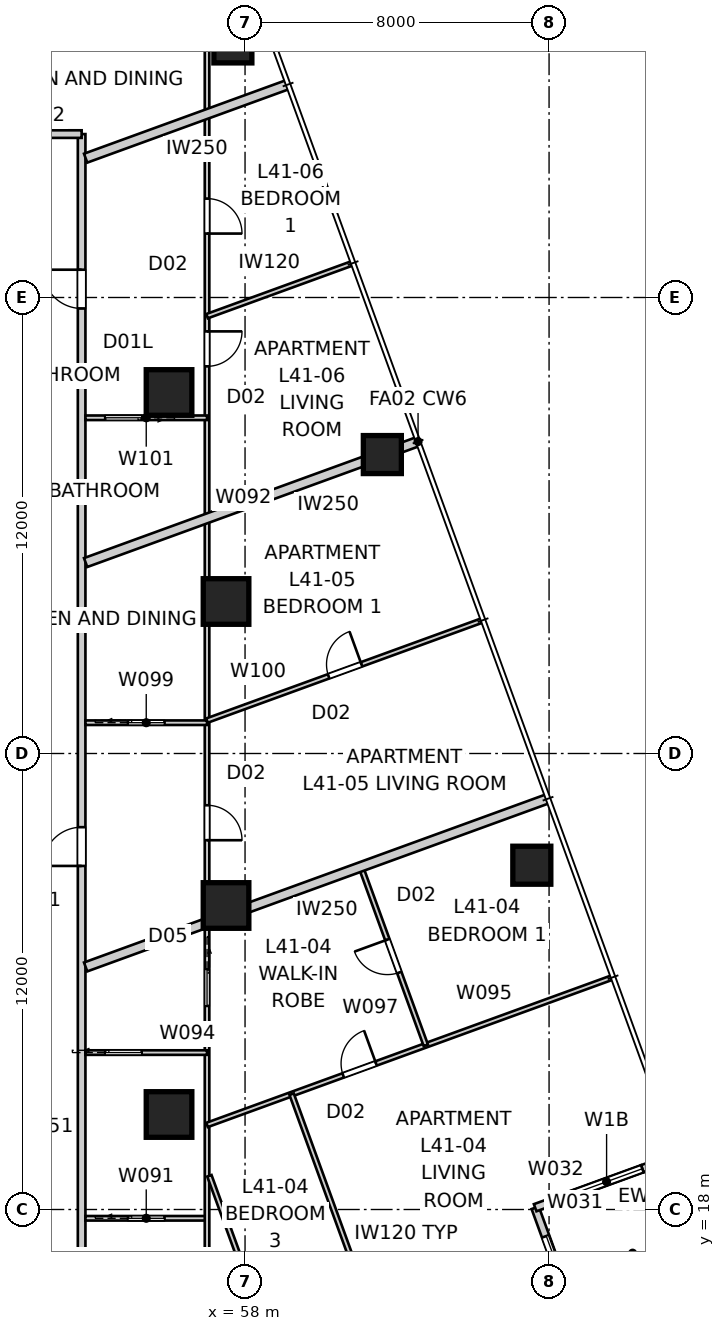
"""IFC4 building model, lengths in metres.
Left out: names, types, materials, properties, quantities, classifications, styles, units other than length and angle.
Written with IfcOpenShell. Run it as: python <this file> out.ifc"""

import sys

from ifc_helpers import new_model, si_unit, direction, frame, frame_2d, origin, origin_2d, place, context, subcontext, project, spatial, rectangle, extrude, element, fill, save


model = new_model("IFC4")
c1 = context("Model", 3, precision=1e-05, world=origin(), true_north=direction((0.0, 1.0)))
c2 = subcontext(c1, "Body", "Model", "MODEL_VIEW")
j1 = project(units=[si_unit("LENGTHUNIT", "METRE"), si_unit("PLANEANGLEUNIT", "RADIAN")], contexts=[c1])
p1 = place(None, origin())
s1 = spatial("IfcSite", under=j1, at=p1, CompositionType="ELEMENT")
p2 = place(p1, origin())
s2 = spatial("IfcBuilding", under=s1, at=p2, CompositionType="ELEMENT")
p3 = place(p2, frame((0.0, 0.0, 150.6)))
s3 = spatial("IfcBuildingStorey", under=s2, at=p3, CompositionType="ELEMENT", Elevation=150.6)
for number, where, z_axis, x_axis in (
    (1, (65.546, 27.06, 0.0), (0.0, 0.0, 1.0), (1.0, 0.0, 0.0)),
    (2, (61.613, 37.866, 0.0), (0.0, 0.0, 1.0), (1.0, 0.0, 0.0)),
    (3, (57.68, 48.673, 0.0), (0.0, 0.0, 1.0), (1.0, 0.0, 0.0)),
):
    element("IfcColumn", number, at=place(p3, frame(where, z_axis=z_axis, x_axis=x_axis)), inside=s3, PredefinedType="COLUMN", context=c2, shape_type="SweptSolid", body=[
        extrude(rectangle(XDim=1.0, YDim=1.0, at=origin_2d()), origin(), (0.0, 0.0, 1.0), 3.4),
    ])
for number, where, z_axis, x_axis in (
    (4, (57.5, 26.0, 0.0), (0.0, 0.0, 1.0), (1.0, 0.0, 0.0)),
    (5, (57.5, 34.0, 0.0), (0.0, 0.0, 1.0), (1.0, 0.0, 0.0)),
    (6, (56.0, 39.5, 0.0), (0.0, 0.0, 1.0), (1.0, 0.0, 0.0)),
    (7, (56.0, 20.5, 0.0), (0.0, 0.0, 1.0), (1.0, 0.0, 0.0)),
):
    element("IfcColumn", number, at=place(p3, frame(where, z_axis=z_axis, x_axis=x_axis)), inside=s3, PredefinedType="COLUMN", context=c2, shape_type="SweptSolid", body=[
        extrude(rectangle(XDim=1.2, YDim=1.2, at=origin_2d()), origin(), (0.0, 0.0, 1.0), 3.4),
    ])
p4 = place(p3, frame((66.729, 15.04, 0.0), z_axis=(0.0, 0.0, 1.0), x_axis=(-0.342018703306, 0.939693144909, 0.0)))
e8 = element("IfcWall", 8, at=p4, inside=s3, PredefinedType="SOLIDWALL", context=c2, shape_type="SweptSolid", body=[
    extrude(rectangle(XDim=3.2, YDim=0.2, at=frame_2d((1.6, 0.0))), origin(), (0.0, 0.0, 1.0), 2.722),
])
p5 = place(p4, origin())
e9 = element("IfcOpeningElement", 9, at=p5, cuts=e8, PredefinedType="OPENING", context=c2, shape_type="SweptSolid", body=[
    extrude(rectangle(XDim=2.4, YDim=2.1, at=frame_2d((1.2, 1.05))), frame((0.0, 0.11, 0.0), z_axis=(0.0, -1.0, 0.0), x_axis=(1.0, 0.0, 0.0)), (0.0, 0.0, 1.0), 0.22),
])
p6 = place(p3, frame((65.634, 18.047, 0.0), z_axis=(0.0, 0.0, 1.0), x_axis=(0.939712609717, 0.341965219194, 0.0)))
e10 = element("IfcWall", 10, at=p6, inside=s3, PredefinedType="SOLIDWALL", context=c2, shape_type="SweptSolid", body=[
    extrude(rectangle(XDim=3.0, YDim=0.2, at=frame_2d((1.5, 0.0))), origin(), (0.0, 0.0, 1.0), 2.722),
])
p7 = place(p6, frame((1.0, 0.0, 0.45)))
e11 = element("IfcOpeningElement", 11, at=p7, cuts=e10, PredefinedType="OPENING", context=c2, shape_type="SweptSolid", body=[
    extrude(rectangle(XDim=2.0, YDim=1.8, at=frame_2d((1.0, 0.9))), frame((0.0, 0.11, 0.0), z_axis=(0.0, -1.0, 0.0), x_axis=(1.0, 0.0, 0.0)), (0.0, 0.0, 1.0), 0.22),
])
p8 = place(p3, frame((68.453, 19.073, 0.0), z_axis=(0.0, 0.0, 1.0), x_axis=(0.939686455819, 0.342037080957, 0.0)))
e12 = element("IfcWall", 12, at=p8, inside=s3, PredefinedType="SOLIDWALL", context=c2, shape_type="SweptSolid", body=[
    extrude(rectangle(XDim=1.0, YDim=0.2, at=frame_2d((0.5, 0.0))), origin(), (0.0, 0.0, 1.0), 3.25),
])
p9 = place(p3, frame((53.7, 13.3, 0.0), z_axis=(0.0, 0.0, 1.0), x_axis=(0.0, 1.0, 0.0)))
e13 = element("IfcWall", 13, at=p9, inside=s3, PredefinedType="PARTITIONING", context=c2, shape_type="SweptSolid", body=[
    extrude(rectangle(XDim=33.0, YDim=0.2, at=frame_2d((16.5, 0.0))), origin(), (0.0, 0.0, 1.0), 3.25),
])
p10 = place(p9, frame((28.411, 0.0, 0.0)))
e14 = element("IfcOpeningElement", 14, at=p10, cuts=e13, PredefinedType="OPENING", context=c2, shape_type="SweptSolid", body=[
    extrude(rectangle(XDim=1.02, YDim=2.1, at=frame_2d((0.51, 1.05))), frame((0.0, 0.11, 0.0), z_axis=(0.0, -1.0, 0.0), x_axis=(1.0, 0.0, 0.0)), (0.0, 0.0, 1.0), 0.22),
])
p11 = place(p9, frame((13.741, 0.0, 0.0)))
e15 = element("IfcOpeningElement", 15, at=p11, cuts=e13, PredefinedType="OPENING", context=c2, shape_type="SweptSolid", body=[
    extrude(rectangle(XDim=1.02, YDim=2.34, at=frame_2d((0.51, 1.17))), frame((0.0, 0.11, 0.0), z_axis=(0.0, -1.0, 0.0), x_axis=(1.0, 0.0, 0.0)), (0.0, 0.0, 1.0), 0.22),
])
p12 = place(p3, frame((53.7, 46.3, 0.0), z_axis=(0.0, 0.0, 1.0), x_axis=(-1.0, 0.0, 0.0)))
e16 = element("IfcWall", 16, at=p12, inside=s3, PredefinedType="PARTITIONING", context=c2, shape_type="SweptSolid", body=[
    extrude(rectangle(XDim=4.458, YDim=0.2, at=frame_2d((2.229, 0.0))), origin(), (0.0, 0.0, 1.0), 3.25),
])
p13 = place(p12, frame((2.347, 0.0, 0.0)))
e17 = element("IfcOpeningElement", 17, at=p13, cuts=e16, PredefinedType="OPENING", context=c2, shape_type="SweptSolid", body=[
    extrude(rectangle(XDim=1.02, YDim=2.34, at=frame_2d((0.51, 1.17))), frame((0.0, 0.11, 0.0), z_axis=(0.0, -1.0, 0.0), x_axis=(1.0, 0.0, 0.0)), (0.0, 0.0, 1.0), 0.22),
])
p14 = place(p3, frame((62.553, 38.208, 0.0), z_axis=(0.0, 0.0, 1.0), x_axis=(-0.939693071685, -0.342018904489, 0.0)))
e18 = element("IfcWall", 18, at=p14, inside=s3, PredefinedType="PARTITIONING", context=c2, shape_type="SweptSolid", body=[
    extrude(rectangle(XDim=9.309, YDim=0.25, at=frame_2d((4.654, 0.0))), origin(), (0.0, 0.0, 1.0), 3.25),
])
p15 = place(p3, frame((65.973, 28.812, 0.0), z_axis=(0.0, 0.0, 1.0), x_axis=(-0.939692090592, -0.342021600019, 0.0)))
e19 = element("IfcWall", 19, at=p15, inside=s3, PredefinedType="PARTITIONING", context=c2, shape_type="SweptSolid", body=[
    extrude(rectangle(XDim=12.949, YDim=0.25, at=frame_2d((6.474, 0.0))), origin(), (0.0, 0.0, 1.0), 3.25),
])
p16 = place(p3, frame((59.132, 47.605, 0.0), z_axis=(0.0, 0.0, 1.0), x_axis=(-0.939690274876, -0.342026588591, 0.0)))
e20 = element("IfcWall", 20, at=p16, inside=s3, PredefinedType="PARTITIONING", context=c2, shape_type="SweptSolid", body=[
    extrude(rectangle(XDim=5.669, YDim=0.25, at=frame_2d((2.834, 0.0))), origin(), (0.0, 0.0, 1.0), 3.25),
])
p17 = place(p3, frame((53.8, 17.769, 0.0), z_axis=(0.0, 0.0, 1.0), x_axis=(1.0, 0.0, 0.0)))
e21 = element("IfcWall", 21, at=p17, inside=s3, PredefinedType="PARTITIONING", context=c2, shape_type="SweptSolid", body=[
    extrude(rectangle(XDim=3.2, YDim=0.12, at=frame_2d((1.6, 0.0))), origin(), (0.0, 0.0, 1.0), 3.25),
])
p18 = place(p17, frame((1.12, 0.0, 0.0)))
e22 = element("IfcOpeningElement", 22, at=p18, cuts=e21, PredefinedType="OPENING", context=c2, shape_type="SweptSolid", body=[
    extrude(rectangle(XDim=0.96, YDim=2.1, at=frame_2d((0.48, 1.05))), frame((0.0, 0.07, 0.0), z_axis=(0.0, -1.0, 0.0), x_axis=(1.0, 0.0, 0.0)), (0.0, 0.0, 1.0), 0.14),
])
p19 = place(p3, frame((57.0, 48.8, 0.0), z_axis=(0.0, 0.0, 1.0), x_axis=(0.0, -1.0, 0.0)))
e23 = element("IfcWall", 23, at=p19, inside=s3, PredefinedType="PARTITIONING", context=c2, shape_type="SweptSolid", body=[
    extrude(rectangle(XDim=38.113, YDim=0.12, at=frame_2d((19.056, 0.0))), origin(), (0.0, 0.0, 1.0), 2.55),
])
p20 = place(p19, frame((4.198, 0.0, 0.0)))
e24 = element("IfcOpeningElement", 24, at=p20, cuts=e23, PredefinedType="OPENING", context=c2, shape_type="SweptSolid", body=[
    extrude(rectangle(XDim=0.92, YDim=2.34, at=frame_2d((0.46, 1.17))), frame((0.0, 0.07, 0.0), z_axis=(0.0, -1.0, 0.0), x_axis=(1.0, 0.0, 0.0)), (0.0, 0.0, 1.0), 0.14),
])
p21 = place(p19, frame((7.692, 0.0, 0.0)))
e25 = element("IfcOpeningElement", 25, at=p21, cuts=e23, PredefinedType="OPENING", context=c2, shape_type="SweptSolid", body=[
    extrude(rectangle(XDim=0.92, YDim=2.34, at=frame_2d((0.46, 1.17))), frame((0.0, 0.07, 0.0), z_axis=(0.0, -1.0, 0.0), x_axis=(1.0, 0.0, 0.0)), (0.0, 0.0, 1.0), 0.14),
])
p22 = place(p19, frame((20.162, 0.0, 0.0)))
e26 = element("IfcOpeningElement", 26, at=p22, cuts=e23, PredefinedType="OPENING", context=c2, shape_type="SweptSolid", body=[
    extrude(rectangle(XDim=0.92, YDim=2.34, at=frame_2d((0.46, 1.17))), frame((0.0, 0.07, 0.0), z_axis=(0.0, -1.0, 0.0), x_axis=(1.0, 0.0, 0.0)), (0.0, 0.0, 1.0), 0.14),
])
p23 = place(p19, frame((34.056, 0.0, 0.0)))
e27 = element("IfcOpeningElement", 27, at=p23, cuts=e23, PredefinedType="OPENING", context=c2, shape_type="SweptSolid", body=[
    extrude(rectangle(XDim=0.92, YDim=2.34, at=frame_2d((0.46, 1.17))), frame((0.0, 0.07, 0.0), z_axis=(0.0, -1.0, 0.0), x_axis=(1.0, 0.0, 0.0)), (0.0, 0.0, 1.0), 0.14),
])
p24 = place(p19, frame((24.482, 0.0, 0.0)))
e28 = element("IfcOpeningElement", 28, at=p24, cuts=e23, PredefinedType="OPENING", context=c2, shape_type="SweptSolid", body=[
    extrude(rectangle(XDim=0.96, YDim=2.1, at=frame_2d((0.48, 1.05))), frame((0.0, 0.07, 0.0), z_axis=(0.0, -1.0, 0.0), x_axis=(1.0, 0.0, 0.0)), (0.0, 0.0, 1.0), 0.14),
])
p25 = place(p3, frame((53.8, 22.129, 0.0), z_axis=(0.0, 0.0, 1.0), x_axis=(1.0, 0.0, 0.0)))
e29 = element("IfcWall", 29, at=p25, inside=s3, PredefinedType="PARTITIONING", context=c2, shape_type="SweptSolid", body=[
    extrude(rectangle(XDim=3.2, YDim=0.12, at=frame_2d((1.6, 0.0))), origin(), (0.0, 0.0, 1.0), 3.25),
])
p26 = place(p25, frame((0.52, 0.0, 0.0)))
e30 = element("IfcOpeningElement", 30, at=p26, cuts=e29, PredefinedType="OPENING", context=c2, shape_type="SweptSolid", body=[
    extrude(rectangle(XDim=0.96, YDim=2.1, at=frame_2d((0.48, 1.05))), frame((0.0, 0.07, 0.0), z_axis=(0.0, -1.0, 0.0), x_axis=(1.0, 0.0, 0.0)), (0.0, 0.0, 1.0), 0.14),
])
p27 = place(p3, frame((57.0, 20.225, 0.0), z_axis=(0.0, 0.0, 1.0), x_axis=(0.939693965364, 0.342016449105, 0.0)))
e31 = element("IfcWall", 31, at=p27, inside=s3, PredefinedType="PARTITIONING", context=c2, shape_type="SweptSolid", body=[
    extrude(rectangle(XDim=11.328, YDim=0.12, at=frame_2d((5.664, 0.0))), origin(), (0.0, 0.0, 1.0), 3.25),
])
p28 = place(p27, frame((3.812, 0.0, 0.0)))
e32 = element("IfcOpeningElement", 32, at=p28, cuts=e31, PredefinedType="OPENING", context=c2, shape_type="SweptSolid", body=[
    extrude(rectangle(XDim=0.92, YDim=2.34, at=frame_2d((0.46, 1.17))), frame((0.0, 0.07, 0.0), z_axis=(0.0, -1.0, 0.0), x_axis=(1.0, 0.0, 0.0)), (0.0, 0.0, 1.0), 0.14),
])
p29 = place(p3, frame((62.29, 12.615, 0.0), z_axis=(0.0, 0.0, 1.0), x_axis=(-0.342038393654, 0.939685978009, 0.0)))
e33 = element("IfcWall", 33, at=p29, inside=s3, PredefinedType="PARTITIONING", context=c2, shape_type="SweptSolid", body=[
    extrude(rectangle(XDim=8.96, YDim=0.12, at=frame_2d((4.48, 0.0))), origin(), (0.0, 0.0, 1.0), 3.25),
])
p30 = place(p3, frame((62.757, 22.32, 0.0), z_axis=(0.0, 0.0, 1.0), x_axis=(-0.341993964619, 0.939702148643, 0.0)))
e34 = element("IfcWall", 34, at=p30, inside=s3, PredefinedType="PARTITIONING", context=c2, shape_type="SweptSolid", body=[
    extrude(rectangle(XDim=5.0, YDim=0.12, at=frame_2d((2.5, 0.0))), origin(), (0.0, 0.0, 1.0), 3.25),
])
p31 = place(p30, frame((2.04, 0.0, 0.0)))
e35 = element("IfcOpeningElement", 35, at=p31, cuts=e34, PredefinedType="OPENING", context=c2, shape_type="SweptSolid", body=[
    extrude(rectangle(XDim=0.92, YDim=2.34, at=frame_2d((0.46, 1.17))), frame((0.0, 0.07, 0.0), z_axis=(0.0, -1.0, 0.0), x_axis=(1.0, 0.0, 0.0)), (0.0, 0.0, 1.0), 0.14),
])
p32 = place(p3, frame((59.689, 11.669, 0.0), z_axis=(0.0, 0.0, 1.0), x_axis=(-0.342003311293, 0.939698746974, 0.0)))
e36 = element("IfcWall", 36, at=p32, inside=s3, PredefinedType="PARTITIONING", context=c2, shape_type="SweptSolid", body=[
    extrude(rectangle(XDim=7.683, YDim=0.12, at=frame_2d((3.841, 0.0))), origin(), (0.0, 0.0, 1.0), 3.25),
])
p33 = place(p32, frame((3.411, 0.0, 0.0)))
e37 = element("IfcOpeningElement", 37, at=p33, cuts=e36, PredefinedType="OPENING", context=c2, shape_type="SweptSolid", body=[
    extrude(rectangle(XDim=0.92, YDim=2.34, at=frame_2d((0.46, 1.17))), frame((0.0, 0.07, 0.0), z_axis=(0.0, -1.0, 0.0), x_axis=(1.0, 0.0, 0.0)), (0.0, 0.0, 1.0), 0.14),
])
p34 = place(p3, frame((53.8, 30.81, 0.0), z_axis=(0.0, 0.0, 1.0), x_axis=(1.0, 0.0, 0.0)))
e38 = element("IfcWall", 38, at=p34, inside=s3, PredefinedType="PARTITIONING", context=c2, shape_type="SweptSolid", body=[
    extrude(rectangle(XDim=3.2, YDim=0.12, at=frame_2d((1.6, 0.0))), origin(), (0.0, 0.0, 1.0), 3.25),
])
p35 = place(p34, frame((1.12, 0.0, 0.0)))
e39 = element("IfcOpeningElement", 39, at=p35, cuts=e38, PredefinedType="OPENING", context=c2, shape_type="SweptSolid", body=[
    extrude(rectangle(XDim=0.96, YDim=2.1, at=frame_2d((0.48, 1.05))), frame((0.0, 0.07, 0.0), z_axis=(0.0, -1.0, 0.0), x_axis=(1.0, 0.0, 0.0)), (0.0, 0.0, 1.0), 0.14),
])
p36 = place(p3, frame((57.0, 30.866, 0.0), z_axis=(0.0, 0.0, 1.0), x_axis=(0.939685835373, 0.342038785519, 0.0)))
e40 = element("IfcWall", 40, at=p36, inside=s3, PredefinedType="PARTITIONING", context=c2, shape_type="SweptSolid", body=[
    extrude(rectangle(XDim=7.689, YDim=0.12, at=frame_2d((3.844, 0.0))), origin(), (0.0, 0.0, 1.0), 3.25),
])
p37 = place(p36, frame((3.404, 0.0, 0.0)))
e41 = element("IfcOpeningElement", 41, at=p37, cuts=e40, PredefinedType="OPENING", context=c2, shape_type="SweptSolid", body=[
    extrude(rectangle(XDim=0.92, YDim=2.34, at=frame_2d((0.46, 1.17))), frame((0.0, 0.07, 0.0), z_axis=(0.0, -1.0, 0.0), x_axis=(1.0, 0.0, 0.0)), (0.0, 0.0, 1.0), 0.14),
])
p38 = place(p3, frame((57.0, 38.835, 0.0), z_axis=(0.0, 0.0, 1.0), x_axis=(-1.0, 0.0, 0.0)))
e42 = element("IfcWall", 42, at=p38, inside=s3, PredefinedType="PARTITIONING", context=c2, shape_type="SweptSolid", body=[
    extrude(rectangle(XDim=3.2, YDim=0.12, at=frame_2d((1.6, 0.0))), origin(), (0.0, 0.0, 1.0), 2.796),
])
p39 = place(p38, frame((1.72, 0.0, 0.0)))
e43 = element("IfcOpeningElement", 43, at=p39, cuts=e42, PredefinedType="OPENING", context=c2, shape_type="SweptSolid", body=[
    extrude(rectangle(XDim=0.96, YDim=2.1, at=frame_2d((0.48, 1.05))), frame((0.0, 0.07, 0.0), z_axis=(0.0, -1.0, 0.0), x_axis=(1.0, 0.0, 0.0)), (0.0, 0.0, 1.0), 0.14),
])
p40 = place(p3, frame((57.0, 41.508, 0.0), z_axis=(0.0, 0.0, 1.0), x_axis=(0.939682468191, 0.342048036063, 0.0)))
e44 = element("IfcWall", 44, at=p40, inside=s3, PredefinedType="PARTITIONING", context=c2, shape_type="SweptSolid", body=[
    extrude(rectangle(XDim=4.049, YDim=0.12, at=frame_2d((2.024, 0.0))), origin(), (0.0, 0.0, 1.0), 3.25),
])
p41 = place(p5, origin())
e45 = element("IfcDoor", 45, at=p41, inside=s3, OperationType="SLIDING_TO_LEFT", PredefinedType="DOOR", context=c2, shape_type="SweptSolid", body=[
    extrude(rectangle(XDim=2.4, YDim=2.1, at=frame_2d((1.2, 1.05))), frame((0.0, 0.025, 0.0), z_axis=(0.0, -1.0, 0.0), x_axis=(1.0, 0.0, 0.0)), (0.0, 0.0, 1.0), 0.05),
])
fill(e9, e45)
p42 = place(p7, origin())
e46 = element("IfcWindow", 46, at=p42, inside=s3, PartitioningType="SINGLE_PANEL", PredefinedType="WINDOW", context=c2, shape_type="SweptSolid", body=[
    extrude(rectangle(XDim=2.0, YDim=1.8, at=frame_2d((1.0, 0.9))), frame((0.0, 0.03, 0.0), z_axis=(0.0, -1.0, 0.0), x_axis=(1.0, 0.0, 0.0)), (0.0, 0.0, 1.0), 0.06),
])
fill(e11, e46)
p43 = place(p10, origin())
e47 = element("IfcDoor", 47, at=p43, inside=s3, OperationType="SINGLE_SWING_RIGHT", PredefinedType="DOOR", context=c2, shape_type="SweptSolid", body=[
    extrude(rectangle(XDim=1.02, YDim=2.1, at=frame_2d((0.51, 1.05))), frame((0.0, 0.025, 0.0), z_axis=(0.0, -1.0, 0.0), x_axis=(1.0, 0.0, 0.0)), (0.0, 0.0, 1.0), 0.05),
])
fill(e14, e47)
p44 = place(p11, origin())
e48 = element("IfcDoor", 48, at=p44, inside=s3, OperationType="SINGLE_SWING_LEFT", PredefinedType="DOOR", context=c2, shape_type="SweptSolid", body=[
    extrude(rectangle(XDim=1.02, YDim=2.34, at=frame_2d((0.51, 1.17))), frame((0.0, 0.025, 0.0), z_axis=(0.0, -1.0, 0.0), x_axis=(1.0, 0.0, 0.0)), (0.0, 0.0, 1.0), 0.05),
])
fill(e15, e48)
p45 = place(p20, origin())
e49 = element("IfcDoor", 49, at=p45, inside=s3, OperationType="SINGLE_SWING_RIGHT", PredefinedType="DOOR", context=c2, shape_type="SweptSolid", body=[
    extrude(rectangle(XDim=0.92, YDim=2.34, at=frame_2d((0.46, 1.17))), frame((0.0, 0.025, 0.0), z_axis=(0.0, -1.0, 0.0), x_axis=(1.0, 0.0, 0.0)), (0.0, 0.0, 1.0), 0.05),
])
fill(e24, e49)
p46 = place(p39, origin())
e50 = element("IfcDoor", 50, at=p46, inside=s3, OperationType="SLIDING_TO_LEFT", PredefinedType="DOOR", context=c2, shape_type="SweptSolid", body=[
    extrude(rectangle(XDim=0.96, YDim=2.1, at=frame_2d((0.48, 1.05))), frame((0.0, 0.025, 0.0), z_axis=(0.0, -1.0, 0.0), x_axis=(1.0, 0.0, 0.0)), (0.0, 0.0, 1.0), 0.05),
])
fill(e43, e50)
p47 = place(p21, origin())
e51 = element("IfcDoor", 51, at=p47, inside=s3, OperationType="SINGLE_SWING_LEFT", PredefinedType="DOOR", context=c2, shape_type="SweptSolid", body=[
    extrude(rectangle(XDim=0.92, YDim=2.34, at=frame_2d((0.46, 1.17))), frame((0.0, 0.025, 0.0), z_axis=(0.0, -1.0, 0.0), x_axis=(1.0, 0.0, 0.0)), (0.0, 0.0, 1.0), 0.05),
])
fill(e25, e51)
p48 = place(p22, origin())
e52 = element("IfcDoor", 52, at=p48, inside=s3, OperationType="SINGLE_SWING_RIGHT", PredefinedType="DOOR", context=c2, shape_type="SweptSolid", body=[
    extrude(rectangle(XDim=0.92, YDim=2.34, at=frame_2d((0.46, 1.17))), frame((0.0, 0.025, 0.0), z_axis=(0.0, -1.0, 0.0), x_axis=(1.0, 0.0, 0.0)), (0.0, 0.0, 1.0), 0.05),
])
fill(e26, e52)
p49 = place(p35, origin())
e53 = element("IfcDoor", 53, at=p49, inside=s3, OperationType="SLIDING_TO_LEFT", PredefinedType="DOOR", context=c2, shape_type="SweptSolid", body=[
    extrude(rectangle(XDim=0.96, YDim=2.1, at=frame_2d((0.48, 1.05))), frame((0.0, 0.025, 0.0), z_axis=(0.0, -1.0, 0.0), x_axis=(1.0, 0.0, 0.0)), (0.0, 0.0, 1.0), 0.05),
])
fill(e39, e53)
p50 = place(p18, origin())
e54 = element("IfcDoor", 54, at=p50, inside=s3, OperationType="SLIDING_TO_LEFT", PredefinedType="DOOR", context=c2, shape_type="SweptSolid", body=[
    extrude(rectangle(XDim=0.96, YDim=2.1, at=frame_2d((0.48, 1.05))), frame((0.0, 0.025, 0.0), z_axis=(0.0, -1.0, 0.0), x_axis=(1.0, 0.0, 0.0)), (0.0, 0.0, 1.0), 0.05),
])
fill(e22, e54)
p51 = place(p37, origin())
e55 = element("IfcDoor", 55, at=p51, inside=s3, OperationType="SINGLE_SWING_RIGHT", PredefinedType="DOOR", context=c2, shape_type="SweptSolid", body=[
    extrude(rectangle(XDim=0.92, YDim=2.34, at=frame_2d((0.46, 1.17))), frame((0.0, 0.025, 0.0), z_axis=(0.0, -1.0, 0.0), x_axis=(1.0, 0.0, 0.0)), (0.0, 0.0, 1.0), 0.05),
])
fill(e41, e55)
p52 = place(p26, origin())
e56 = element("IfcDoor", 56, at=p52, inside=s3, OperationType="SLIDING_TO_LEFT", PredefinedType="DOOR", context=c2, shape_type="SweptSolid", body=[
    extrude(rectangle(XDim=0.96, YDim=2.1, at=frame_2d((0.48, 1.05))), frame((0.0, 0.025, 0.0), z_axis=(0.0, -1.0, 0.0), x_axis=(1.0, 0.0, 0.0)), (0.0, 0.0, 1.0), 0.05),
])
fill(e30, e56)
p53 = place(p24, origin())
e57 = element("IfcDoor", 57, at=p53, inside=s3, OperationType="SLIDING_TO_LEFT", PredefinedType="DOOR", context=c2, shape_type="SweptSolid", body=[
    extrude(rectangle(XDim=0.96, YDim=2.1, at=frame_2d((0.48, 1.05))), frame((0.0, 0.025, 0.0), z_axis=(0.0, -1.0, 0.0), x_axis=(1.0, 0.0, 0.0)), (0.0, 0.0, 1.0), 0.05),
])
fill(e28, e57)
p54 = place(p31, origin())
e58 = element("IfcDoor", 58, at=p54, inside=s3, OperationType="SINGLE_SWING_RIGHT", PredefinedType="DOOR", context=c2, shape_type="SweptSolid", body=[
    extrude(rectangle(XDim=0.92, YDim=2.34, at=frame_2d((0.46, 1.17))), frame((0.0, 0.025, 0.0), z_axis=(0.0, -1.0, 0.0), x_axis=(1.0, 0.0, 0.0)), (0.0, 0.0, 1.0), 0.05),
])
fill(e35, e58)
p55 = place(p28, origin())
e59 = element("IfcDoor", 59, at=p55, inside=s3, OperationType="SINGLE_SWING_RIGHT", PredefinedType="DOOR", context=c2, shape_type="SweptSolid", body=[
    extrude(rectangle(XDim=0.92, YDim=2.34, at=frame_2d((0.46, 1.17))), frame((0.0, 0.025, 0.0), z_axis=(0.0, -1.0, 0.0), x_axis=(1.0, 0.0, 0.0)), (0.0, 0.0, 1.0), 0.05),
])
fill(e32, e59)
save(model, sys.argv[1])
